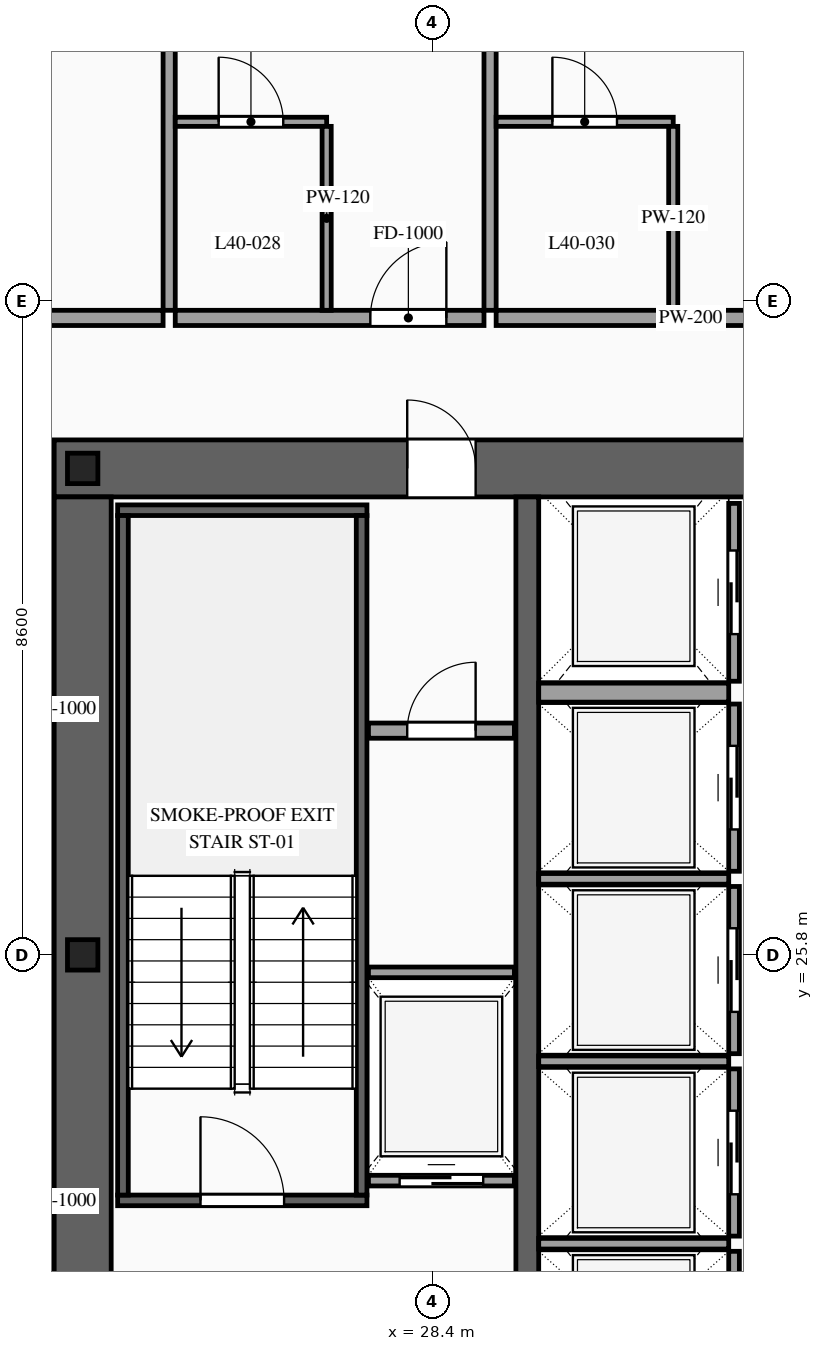
"""IFC4 building model, lengths in metres.
Left out: names, types, materials, properties, quantities, classifications, styles, units other than length and angle.
Written with IfcOpenShell. Run it as: python <this file> out.ifc"""

import sys

from ifc_helpers import new_model, si_unit, direction, frame, frame_2d, origin, origin_2d, place, context, subcontext, project, spatial, rectangle, i_section, extrude, source, transform, mapped, element, fill, save


model = new_model("IFC4")
c1 = context("Model", 3, precision=1e-05, world=origin(), true_north=direction((0.0, 1.0)))
c2 = subcontext(c1, "Body", "Model", "MODEL_VIEW")
j1 = project(units=[si_unit("LENGTHUNIT", "METRE"), si_unit("PLANEANGLEUNIT", "RADIAN")], contexts=[c1])
p1 = place(None, origin())
s1 = spatial("IfcSite", under=j1, at=p1, CompositionType="ELEMENT")
p2 = place(p1, origin())
s2 = spatial("IfcBuilding", under=s1, at=p2, CompositionType="ELEMENT")
p3 = place(p2, frame((0.0, 0.0, 152.4)))
s3 = spatial("IfcBuildingStorey", under=s2, at=p3, CompositionType="ELEMENT", Elevation=152.4)
p4 = place(p3, frame((23.425, 32.2, 0.0), z_axis=(0.0, 0.0, 1.0), x_axis=(1.0, 0.0, 0.0)))
e1 = element("IfcWall", 1, at=p4, inside=s3, PredefinedType="SHEAR", context=c2, shape_type="SweptSolid", body=[
    extrude(rectangle(XDim=27.15, YDim=0.75, at=frame_2d((13.575, 0.0))), origin(), (0.0, 0.0, 1.0), 3.6),
])
p5 = place(p4, frame((4.645, 0.0, 0.0)))
e2 = element("IfcOpeningElement", 2, at=p5, cuts=e1, PredefinedType="OPENING", context=c2, shape_type="SweptSolid", body=[
    extrude(rectangle(XDim=0.9, YDim=2.15, at=frame_2d((0.45, 1.075))), frame((0.0, 0.39, 0.0), z_axis=(0.0, -1.0, 0.0), x_axis=(1.0, 0.0, 0.0)), (0.0, 0.0, 1.0), 0.78),
])
p6 = place(p4, frame((9.925, 0.0, 0.0)))
e3 = element("IfcOpeningElement", 3, at=p6, cuts=e1, PredefinedType="OPENING", context=c2, shape_type="SweptSolid", body=[
    extrude(rectangle(XDim=1.1, YDim=2.2, at=frame_2d((0.55, 1.1))), frame((0.0, 0.39, 0.0), z_axis=(0.0, -1.0, 0.0), x_axis=(1.0, 0.0, 0.0)), (0.0, 0.0, 1.0), 0.78),
])
p7 = place(p4, frame((15.775, 0.0, 0.0)))
e4 = element("IfcOpeningElement", 4, at=p7, cuts=e1, PredefinedType="OPENING", context=c2, shape_type="SweptSolid", body=[
    extrude(rectangle(XDim=1.1, YDim=2.2, at=frame_2d((0.55, 1.1))), frame((0.0, 0.39, 0.0), z_axis=(0.0, -1.0, 0.0), x_axis=(1.0, 0.0, 0.0)), (0.0, 0.0, 1.0), 0.78),
])
p8 = place(p4, frame((19.745, 0.0, 0.0)))
e5 = element("IfcOpeningElement", 5, at=p8, cuts=e1, PredefinedType="OPENING", context=c2, shape_type="SweptSolid", body=[
    extrude(rectangle(XDim=0.9, YDim=2.15, at=frame_2d((0.45, 1.075))), frame((0.0, 0.39, 0.0), z_axis=(0.0, -1.0, 0.0), x_axis=(1.0, 0.0, 0.0)), (0.0, 0.0, 1.0), 0.78),
])
m1 = source(origin(), c2, "Body", "SweptSolid", [
    extrude(rectangle(XDim=12.05, YDim=0.75, at=frame_2d((6.025, 0.0))), origin(), (0.0, 0.0, 1.0), 3.6),
])
p9 = place(p3, frame((23.8, 19.775, 0.0), z_axis=(0.0, 0.0, 1.0), x_axis=(0.0, 1.0, 0.0)))
e6 = element("IfcWall", 6, at=p9, inside=s3, PredefinedType="SHEAR", context=c2, shape_type="MappedRepresentation", body=[
    mapped(m1, transform((0.0, 0.0, 0.0), scale=1.0)),
])
m2 = source(origin(), c2, "Body", "SweptSolid", [
    extrude(rectangle(XDim=12.05, YDim=0.3, at=frame_2d((6.025, 0.0))), origin(), (0.0, 0.0, 1.0), 3.6),
])
p10 = place(p3, frame((29.65, 19.775, 0.0), z_axis=(0.0, 0.0, 1.0), x_axis=(0.0, 1.0, 0.0)))
e7 = element("IfcWall", 7, at=p10, inside=s3, PredefinedType="SOLIDWALL", context=c2, shape_type="MappedRepresentation", body=[
    mapped(m2, transform((0.0, 0.0, 0.0), scale=1.0)),
])
m3 = source(origin(), c2, "Body", "SweptSolid", [
    extrude(i_section(OverallWidth=0.4, OverallDepth=0.4, WebThickness=0.013, FlangeThickness=0.021, at=origin_2d()), origin(), (0.0, 0.0, 1.0), 3.6),
])
for number, where, z_axis, x_axis in (
    (8, (23.8, 25.8, 0.0), (0.0, 0.0, 1.0), (1.0, 0.0, 0.0)),
    (9, (23.8, 32.2, 0.0), (0.0, 0.0, 1.0), (1.0, 0.0, 0.0)),
):
    element("IfcColumn", number, at=place(p3, frame(where, z_axis=z_axis, x_axis=x_axis)), inside=s3, PredefinedType="COLUMN", context=c2, shape_type="MappedRepresentation", body=[
        mapped(m3, transform((0.0, 0.0, 0.0), scale=1.0)),
    ])
p11 = place(p3, frame((27.56, 22.83, 0.0), z_axis=(0.0, 0.0, 1.0), x_axis=(1.0, 0.0, 0.0)))
e10 = element("IfcWall", 10, at=p11, inside=s3, PredefinedType="SOLIDWALL", context=c2, shape_type="SweptSolid", body=[
    extrude(rectangle(XDim=1.92, YDim=0.14, at=frame_2d((0.96, 0.0))), origin(), (0.0, 0.0, 1.0), 3.38),
])
p12 = place(p11, frame((0.41, 0.0, 0.0)))
e11 = element("IfcOpeningElement", 11, at=p12, cuts=e10, PredefinedType="OPENING", context=c2, shape_type="SweptSolid", body=[
    extrude(rectangle(XDim=1.1, YDim=2.2, at=frame_2d((0.55, 1.1))), frame((0.0, 0.085, 0.0), z_axis=(0.0, -1.0, 0.0), x_axis=(1.0, 0.0, 0.0)), (0.0, 0.0, 1.0), 0.17),
])
m4 = source(origin(), c2, "Body", "SweptSolid", [
    extrude(rectangle(XDim=1.92, YDim=0.14, at=frame_2d((0.96, 0.0))), origin(), (0.0, 0.0, 1.0), 3.38),
])
p13 = place(p3, frame((27.56, 25.57, 0.0), z_axis=(0.0, 0.0, 1.0), x_axis=(1.0, 0.0, 0.0)))
e12 = element("IfcWall", 12, at=p13, inside=s3, PredefinedType="SOLIDWALL", context=c2, shape_type="MappedRepresentation", body=[
    mapped(m4, transform((0.0, 0.0, 0.0), scale=1.0)),
])
p14 = place(p3, frame((32.37, 19.86, 0.0), z_axis=(0.0, 0.0, 1.0), x_axis=(0.0, 1.0, 0.0)))
e13 = element("IfcWall", 13, at=p14, inside=s3, PredefinedType="SOLIDWALL", context=c2, shape_type="SweptSolid", body=[
    extrude(rectangle(XDim=2.04, YDim=0.14, at=frame_2d((1.02, 0.0))), origin(), (0.0, 0.0, 1.0), 3.38),
])
p15 = place(p14, frame((0.47, 0.0, 0.0)))
e14 = element("IfcOpeningElement", 14, at=p15, cuts=e13, PredefinedType="OPENING", context=c2, shape_type="SweptSolid", body=[
    extrude(rectangle(XDim=1.1, YDim=2.2, at=frame_2d((0.55, 1.1))), frame((0.0, 0.085, 0.0), z_axis=(0.0, -1.0, 0.0), x_axis=(1.0, 0.0, 0.0)), (0.0, 0.0, 1.0), 0.17),
])
m5 = source(origin(), c2, "Body", "SweptSolid", [
    extrude(rectangle(XDim=2.5, YDim=0.14, at=frame_2d((1.25, 0.0))), origin(), (0.0, 0.0, 1.0), 3.38),
])
p16 = place(p3, frame((29.8, 22.0, 0.0), z_axis=(0.0, 0.0, 1.0), x_axis=(1.0, 0.0, 0.0)))
e15 = element("IfcWall", 15, at=p16, inside=s3, PredefinedType="SOLIDWALL", context=c2, shape_type="MappedRepresentation", body=[
    mapped(m5, transform((0.0, 0.0, 0.0), scale=1.0)),
])
p17 = place(p3, frame((32.37, 22.1, 0.0), z_axis=(0.0, 0.0, 1.0), x_axis=(0.0, 1.0, 0.0)))
e16 = element("IfcWall", 16, at=p17, inside=s3, PredefinedType="SOLIDWALL", context=c2, shape_type="SweptSolid", body=[
    extrude(rectangle(XDim=2.2, YDim=0.14, at=frame_2d((1.1, 0.0))), origin(), (0.0, 0.0, 1.0), 3.38),
])
p18 = place(p17, frame((0.55, 0.0, 0.0)))
e17 = element("IfcOpeningElement", 17, at=p18, cuts=e16, PredefinedType="OPENING", context=c2, shape_type="SweptSolid", body=[
    extrude(rectangle(XDim=1.1, YDim=2.2, at=frame_2d((0.55, 1.1))), frame((0.0, 0.085, 0.0), z_axis=(0.0, -1.0, 0.0), x_axis=(1.0, 0.0, 0.0)), (0.0, 0.0, 1.0), 0.17),
])
p19 = place(p3, frame((29.8, 24.4, 0.0), z_axis=(0.0, 0.0, 1.0), x_axis=(1.0, 0.0, 0.0)))
e18 = element("IfcWall", 18, at=p19, inside=s3, PredefinedType="SOLIDWALL", context=c2, shape_type="MappedRepresentation", body=[
    mapped(m5, transform((0.0, 0.0, 0.0), scale=1.0)),
])
p20 = place(p3, frame((32.37, 24.5, 0.0), z_axis=(0.0, 0.0, 1.0), x_axis=(0.0, 1.0, 0.0)))
e19 = element("IfcWall", 19, at=p20, inside=s3, PredefinedType="SOLIDWALL", context=c2, shape_type="SweptSolid", body=[
    extrude(rectangle(XDim=2.2, YDim=0.14, at=frame_2d((1.1, 0.0))), origin(), (0.0, 0.0, 1.0), 3.38),
])
p21 = place(p20, frame((0.55, 0.0, 0.0)))
e20 = element("IfcOpeningElement", 20, at=p21, cuts=e19, PredefinedType="OPENING", context=c2, shape_type="SweptSolid", body=[
    extrude(rectangle(XDim=1.1, YDim=2.2, at=frame_2d((0.55, 1.1))), frame((0.0, 0.085, 0.0), z_axis=(0.0, -1.0, 0.0), x_axis=(1.0, 0.0, 0.0)), (0.0, 0.0, 1.0), 0.17),
])
p22 = place(p3, frame((29.8, 26.8, 0.0), z_axis=(0.0, 0.0, 1.0), x_axis=(1.0, 0.0, 0.0)))
e21 = element("IfcWall", 21, at=p22, inside=s3, PredefinedType="SOLIDWALL", context=c2, shape_type="MappedRepresentation", body=[
    mapped(m5, transform((0.0, 0.0, 0.0), scale=1.0)),
])
p23 = place(p3, frame((32.37, 26.9, 0.0), z_axis=(0.0, 0.0, 1.0), x_axis=(0.0, 1.0, 0.0)))
e22 = element("IfcWall", 22, at=p23, inside=s3, PredefinedType="SOLIDWALL", context=c2, shape_type="SweptSolid", body=[
    extrude(rectangle(XDim=2.2, YDim=0.14, at=frame_2d((1.1, 0.0))), origin(), (0.0, 0.0, 1.0), 3.38),
])
p24 = place(p23, frame((0.55, 0.0, 0.0)))
e23 = element("IfcOpeningElement", 23, at=p24, cuts=e22, PredefinedType="OPENING", context=c2, shape_type="SweptSolid", body=[
    extrude(rectangle(XDim=1.1, YDim=2.2, at=frame_2d((0.55, 1.1))), frame((0.0, 0.085, 0.0), z_axis=(0.0, -1.0, 0.0), x_axis=(1.0, 0.0, 0.0)), (0.0, 0.0, 1.0), 0.17),
])
p25 = place(p3, frame((32.37, 29.4, 0.0), z_axis=(0.0, 0.0, 1.0), x_axis=(0.0, 1.0, 0.0)))
e24 = element("IfcWall", 24, at=p25, inside=s3, PredefinedType="SOLIDWALL", context=c2, shape_type="SweptSolid", body=[
    extrude(rectangle(XDim=2.34, YDim=0.14, at=frame_2d((1.17, 0.0))), origin(), (0.0, 0.0, 1.0), 3.38),
])
p26 = place(p25, frame((0.62, 0.0, 0.0)))
e25 = element("IfcOpeningElement", 25, at=p26, cuts=e24, PredefinedType="OPENING", context=c2, shape_type="SweptSolid", body=[
    extrude(rectangle(XDim=1.1, YDim=2.2, at=frame_2d((0.55, 1.1))), frame((0.0, 0.085, 0.0), z_axis=(0.0, -1.0, 0.0), x_axis=(1.0, 0.0, 0.0)), (0.0, 0.0, 1.0), 0.17),
])
m6 = source(origin(), c2, "Body", "SweptSolid", [
    extrude(rectangle(XDim=2.5, YDim=0.25, at=frame_2d((1.25, 0.0))), origin(), (0.0, 0.0, 1.0), 3.38),
])
p27 = place(p3, frame((29.8, 29.25, 0.0), z_axis=(0.0, 0.0, 1.0), x_axis=(1.0, 0.0, 0.0)))
e26 = element("IfcWall", 26, at=p27, inside=s3, PredefinedType="SOLIDWALL", context=c2, shape_type="MappedRepresentation", body=[
    mapped(m6, transform((0.0, 0.0, 0.0), scale=1.0)),
])
p28 = place(p3, frame((24.26, 22.57, 0.0), z_axis=(0.0, 0.0, 1.0), x_axis=(1.0, 0.0, 0.0)))
e27 = element("IfcWall", 27, at=p28, inside=s3, PredefinedType="SOLIDWALL", context=c2, shape_type="SweptSolid", body=[
    extrude(rectangle(XDim=3.28, YDim=0.14, at=frame_2d((1.64, 0.0))), origin(), (0.0, 0.0, 1.0), 3.38),
])
p29 = place(p28, frame((1.09, 0.0, 0.0)))
e28 = element("IfcOpeningElement", 28, at=p29, cuts=e27, PredefinedType="OPENING", context=c2, shape_type="SweptSolid", body=[
    extrude(rectangle(XDim=1.1, YDim=2.2, at=frame_2d((0.55, 1.1))), frame((0.0, 0.085, 0.0), z_axis=(0.0, -1.0, 0.0), x_axis=(1.0, 0.0, 0.0)), (0.0, 0.0, 1.0), 0.17),
])
m7 = source(origin(), c2, "Body", "SweptSolid", [
    extrude(rectangle(XDim=3.28, YDim=0.14, at=frame_2d((1.64, 0.0))), origin(), (0.0, 0.0, 1.0), 3.38),
])
p30 = place(p3, frame((24.26, 31.65, 0.0), z_axis=(0.0, 0.0, 1.0), x_axis=(1.0, 0.0, 0.0)))
e29 = element("IfcWall", 29, at=p30, inside=s3, PredefinedType="SOLIDWALL", context=c2, shape_type="MappedRepresentation", body=[
    mapped(m7, transform((0.0, 0.0, 0.0), scale=1.0)),
])
m8 = source(origin(), c2, "Body", "SweptSolid", [
    extrude(rectangle(XDim=8.94, YDim=0.14, at=frame_2d((4.47, 0.0))), origin(), (0.0, 0.0, 1.0), 3.38),
])
for number, where, z_axis, x_axis in (
    (30, (24.33, 22.64, 0.0), (0.0, 0.0, 1.0), (0.0, 1.0, 0.0)),
    (31, (27.47, 22.64, 0.0), (0.0, 0.0, 1.0), (0.0, 1.0, 0.0)),
):
    element("IfcWall", number, at=place(p3, frame(where, z_axis=z_axis, x_axis=x_axis)), inside=s3, PredefinedType="SOLIDWALL", context=c2, shape_type="MappedRepresentation", body=[
        mapped(m8, transform((0.0, 0.0, 0.0), scale=1.0)),
    ])
p31 = place(p3, frame((27.56, 28.75, 0.0), z_axis=(0.0, 0.0, 1.0), x_axis=(1.0, 0.0, 0.0)))
e32 = element("IfcWall", 32, at=p31, inside=s3, PredefinedType="PARTITIONING", context=c2, shape_type="SweptSolid", body=[
    extrude(rectangle(XDim=1.92, YDim=0.2, at=frame_2d((0.96, 0.0))), origin(), (0.0, 0.0, 1.0), 3.38),
])
p32 = place(p31, frame((0.51, 0.0, 0.0)))
e33 = element("IfcOpeningElement", 33, at=p32, cuts=e32, PredefinedType="OPENING", context=c2, shape_type="SweptSolid", body=[
    extrude(rectangle(XDim=0.9, YDim=2.15, at=frame_2d((0.45, 1.075))), frame((0.0, 0.115, 0.0), z_axis=(0.0, -1.0, 0.0), x_axis=(1.0, 0.0, 0.0)), (0.0, 0.0, 1.0), 0.23),
])
p33 = place(p3, frame((16.44, 34.18, 0.0), z_axis=(0.0, 0.0, 1.0), x_axis=(1.0, 0.0, 0.0)))
e34 = element("IfcWall", 34, at=p33, inside=s3, PredefinedType="PARTITIONING", context=c2, shape_type="SweptSolid", body=[
    extrude(rectangle(XDim=8.418, YDim=0.2, at=frame_2d((4.209, 0.0))), origin(), (0.0, 0.0, 1.0), 3.38),
])
p34 = place(p33, frame((4.914, 0.0, 0.0)))
e35 = element("IfcOpeningElement", 35, at=p34, cuts=e34, PredefinedType="OPENING", context=c2, shape_type="SweptSolid", body=[
    extrude(rectangle(XDim=1.0, YDim=2.2, at=frame_2d((0.5, 1.1))), frame((0.0, 0.115, 0.0), z_axis=(0.0, -1.0, 0.0), x_axis=(1.0, 0.0, 0.0)), (0.0, 0.0, 1.0), 0.23),
])
m9 = source(origin(), c2, "Body", "SweptSolid", [
    extrude(rectangle(XDim=14.97, YDim=0.16, at=frame_2d((7.485, 0.0))), origin(), (0.0, 0.0, 1.0), 3.38),
])
p35 = place(p3, frame((24.938, 34.28, 0.0), z_axis=(0.0, 0.0, 1.0), x_axis=(0.0, 1.0, 0.0)))
e36 = element("IfcWall", 36, at=p35, inside=s3, PredefinedType="PARTITIONING", context=c2, shape_type="MappedRepresentation", body=[
    mapped(m9, transform((0.0, 0.0, 0.0), scale=1.0)),
])
p36 = place(p3, frame((25.018, 34.18, 0.0), z_axis=(0.0, 0.0, 1.0), x_axis=(1.0, 0.0, 0.0)))
e37 = element("IfcWall", 37, at=p36, inside=s3, PredefinedType="PARTITIONING", context=c2, shape_type="SweptSolid", body=[
    extrude(rectangle(XDim=4.062, YDim=0.2, at=frame_2d((2.031, 0.0))), origin(), (0.0, 0.0, 1.0), 3.38),
])
p37 = place(p36, frame((2.567, 0.0, 0.0)))
e38 = element("IfcOpeningElement", 38, at=p37, cuts=e37, PredefinedType="OPENING", context=c2, shape_type="SweptSolid", body=[
    extrude(rectangle(XDim=1.0, YDim=2.2, at=frame_2d((0.5, 1.1))), frame((0.0, 0.115, 0.0), z_axis=(0.0, -1.0, 0.0), x_axis=(1.0, 0.0, 0.0)), (0.0, 0.0, 1.0), 0.23),
])
p38 = place(p3, frame((29.16, 34.28, 0.0), z_axis=(0.0, 0.0, 1.0), x_axis=(0.0, 1.0, 0.0)))
e39 = element("IfcWall", 39, at=p38, inside=s3, PredefinedType="PARTITIONING", context=c2, shape_type="MappedRepresentation", body=[
    mapped(m9, transform((0.0, 0.0, 0.0), scale=1.0)),
])
p39 = place(p3, frame((25.018, 36.76, 0.0), z_axis=(0.0, 0.0, 1.0), x_axis=(1.0, 0.0, 0.0)))
e40 = element("IfcWall", 40, at=p39, inside=s3, PredefinedType="PARTITIONING", context=c2, shape_type="SweptSolid", body=[
    extrude(rectangle(XDim=1.992, YDim=0.12, at=frame_2d((0.996, 0.0))), origin(), (0.0, 0.0, 1.0), 3.38),
])
p40 = place(p39, frame((0.571, 0.0, 0.0)))
e41 = element("IfcOpeningElement", 41, at=p40, cuts=e40, PredefinedType="OPENING", context=c2, shape_type="SweptSolid", body=[
    extrude(rectangle(XDim=0.85, YDim=2.1, at=frame_2d((0.425, 1.05))), frame((0.0, 0.075, 0.0), z_axis=(0.0, -1.0, 0.0), x_axis=(1.0, 0.0, 0.0)), (0.0, 0.0, 1.0), 0.15),
])
m10 = source(origin(), c2, "Body", "SweptSolid", [
    extrude(rectangle(XDim=2.42, YDim=0.12, at=frame_2d((1.21, 0.0))), origin(), (0.0, 0.0, 1.0), 3.38),
])
p41 = place(p3, frame((27.01, 34.28, 0.0), z_axis=(0.0, 0.0, 1.0), x_axis=(0.0, 1.0, 0.0)))
e42 = element("IfcWall", 42, at=p41, inside=s3, PredefinedType="PARTITIONING", context=c2, shape_type="MappedRepresentation", body=[
    mapped(m10, transform((0.0, 0.0, 0.0), scale=1.0)),
])
p42 = place(p3, frame((29.24, 34.18, 0.0), z_axis=(0.0, 0.0, 1.0), x_axis=(1.0, 0.0, 0.0)))
e43 = element("IfcWall", 43, at=p42, inside=s3, PredefinedType="PARTITIONING", context=c2, shape_type="SweptSolid", body=[
    extrude(rectangle(XDim=9.325, YDim=0.2, at=frame_2d((4.663, 0.0))), origin(), (0.0, 0.0, 1.0), 3.38),
])
p43 = place(p42, frame((5.368, 0.0, 0.0)))
e44 = element("IfcOpeningElement", 44, at=p43, cuts=e43, PredefinedType="OPENING", context=c2, shape_type="SweptSolid", body=[
    extrude(rectangle(XDim=1.0, YDim=2.2, at=frame_2d((0.5, 1.1))), frame((0.0, 0.115, 0.0), z_axis=(0.0, -1.0, 0.0), x_axis=(1.0, 0.0, 0.0)), (0.0, 0.0, 1.0), 0.23),
])
p44 = place(p3, frame((29.24, 36.76, 0.0), z_axis=(0.0, 0.0, 1.0), x_axis=(1.0, 0.0, 0.0)))
e45 = element("IfcWall", 45, at=p44, inside=s3, PredefinedType="PARTITIONING", context=c2, shape_type="SweptSolid", body=[
    extrude(rectangle(XDim=2.33, YDim=0.12, at=frame_2d((1.165, 0.0))), origin(), (0.0, 0.0, 1.0), 3.38),
])
p45 = place(p44, frame((0.74, 0.0, 0.0)))
e46 = element("IfcOpeningElement", 46, at=p45, cuts=e45, PredefinedType="OPENING", context=c2, shape_type="SweptSolid", body=[
    extrude(rectangle(XDim=0.85, YDim=2.1, at=frame_2d((0.425, 1.05))), frame((0.0, 0.075, 0.0), z_axis=(0.0, -1.0, 0.0), x_axis=(1.0, 0.0, 0.0)), (0.0, 0.0, 1.0), 0.15),
])
p46 = place(p3, frame((31.57, 34.28, 0.0), z_axis=(0.0, 0.0, 1.0), x_axis=(0.0, 1.0, 0.0)))
e47 = element("IfcWall", 47, at=p46, inside=s3, PredefinedType="PARTITIONING", context=c2, shape_type="MappedRepresentation", body=[
    mapped(m10, transform((0.0, 0.0, 0.0), scale=1.0)),
])
m11 = source(origin(), c2, "Body", "SweptSolid", [
    extrude(rectangle(XDim=1.1, YDim=2.2, at=frame_2d((0.55, 1.1))), frame((0.0, 0.025, 0.0), z_axis=(0.0, -1.0, 0.0), x_axis=(1.0, 0.0, 0.0)), (0.0, 0.0, 1.0), 0.05),
])
p47 = place(p12, origin())
e48 = element("IfcDoor", 48, at=p47, inside=s3, OperationType="SLIDING_TO_LEFT", PredefinedType="DOOR", context=c2, shape_type="MappedRepresentation", body=[
    mapped(m11, transform((0.0, 0.0, 0.0), scale=1.0)),
])
fill(e11, e48)
p48 = place(p18, origin())
e49 = element("IfcDoor", 49, at=p48, inside=s3, OperationType="SLIDING_TO_RIGHT", PredefinedType="DOOR", context=c2, shape_type="MappedRepresentation", body=[
    mapped(m11, transform((0.0, 0.0, 0.0), scale=1.0)),
])
fill(e17, e49)
p49 = place(p21, origin())
e50 = element("IfcDoor", 50, at=p49, inside=s3, OperationType="SLIDING_TO_LEFT", PredefinedType="DOOR", context=c2, shape_type="MappedRepresentation", body=[
    mapped(m11, transform((0.0, 0.0, 0.0), scale=1.0)),
])
fill(e20, e50)
p50 = place(p24, origin())
e51 = element("IfcDoor", 51, at=p50, inside=s3, OperationType="SLIDING_TO_RIGHT", PredefinedType="DOOR", context=c2, shape_type="MappedRepresentation", body=[
    mapped(m11, transform((0.0, 0.0, 0.0), scale=1.0)),
])
fill(e23, e51)
p51 = place(p26, origin())
e52 = element("IfcDoor", 52, at=p51, inside=s3, OperationType="SLIDING_TO_LEFT", PredefinedType="DOOR", context=c2, shape_type="MappedRepresentation", body=[
    mapped(m11, transform((0.0, 0.0, 0.0), scale=1.0)),
])
fill(e25, e52)
m12 = source(origin(), c2, "Body", "SweptSolid", [
    extrude(rectangle(XDim=1.1, YDim=2.2, at=frame_2d((0.55, 1.1))), frame((0.0, 0.025, 0.0), z_axis=(0.0, -1.0, 0.0), x_axis=(1.0, 0.0, 0.0)), (0.0, 0.0, 1.0), 0.05),
])
p52 = place(p29, origin())
e53 = element("IfcDoor", 53, at=p52, inside=s3, OperationType="SINGLE_SWING_LEFT", PredefinedType="DOOR", context=c2, shape_type="MappedRepresentation", body=[
    mapped(m12, transform((0.0, 0.0, 0.0), scale=1.0)),
])
fill(e28, e53)
m13 = source(origin(), c2, "Body", "SweptSolid", [
    extrude(rectangle(XDim=0.9, YDim=2.15, at=frame_2d((0.45, 1.075))), frame((0.0, 0.025, 0.0), z_axis=(0.0, -1.0, 0.0), x_axis=(1.0, 0.0, 0.0)), (0.0, 0.0, 1.0), 0.05),
])
p53 = place(p5, origin())
e54 = element("IfcDoor", 54, at=p53, inside=s3, OperationType="SINGLE_SWING_LEFT", PredefinedType="DOOR", context=c2, shape_type="MappedRepresentation", body=[
    mapped(m13, transform((0.0, 0.0, 0.0), scale=1.0)),
])
fill(e2, e54)
p54 = place(p32, origin())
e55 = element("IfcDoor", 55, at=p54, inside=s3, OperationType="SINGLE_SWING_RIGHT", PredefinedType="DOOR", context=c2, shape_type="MappedRepresentation", body=[
    mapped(m13, transform((0.0, 0.0, 0.0), scale=1.0)),
])
fill(e33, e55)
m14 = source(origin(), c2, "Body", "SweptSolid", [
    extrude(rectangle(XDim=1.0, YDim=2.2, at=frame_2d((0.5, 1.1))), frame((0.0, 0.025, 0.0), z_axis=(0.0, -1.0, 0.0), x_axis=(1.0, 0.0, 0.0)), (0.0, 0.0, 1.0), 0.05),
])
p55 = place(p37, origin())
e56 = element("IfcDoor", 56, at=p55, inside=s3, OperationType="SINGLE_SWING_RIGHT", PredefinedType="DOOR", context=c2, shape_type="MappedRepresentation", body=[
    mapped(m14, transform((0.0, 0.0, 0.0), scale=1.0)),
])
fill(e38, e56)
m15 = source(origin(), c2, "Body", "SweptSolid", [
    extrude(rectangle(XDim=0.85, YDim=2.1, at=frame_2d((0.425, 1.05))), frame((0.0, 0.025, 0.0), z_axis=(0.0, -1.0, 0.0), x_axis=(1.0, 0.0, 0.0)), (0.0, 0.0, 1.0), 0.05),
])
p56 = place(p40, origin())
e57 = element("IfcDoor", 57, at=p56, inside=s3, OperationType="SINGLE_SWING_LEFT", PredefinedType="DOOR", context=c2, shape_type="MappedRepresentation", body=[
    mapped(m15, transform((0.0, 0.0, 0.0), scale=1.0)),
])
fill(e41, e57)
p57 = place(p45, origin())
e58 = element("IfcDoor", 58, at=p57, inside=s3, OperationType="SINGLE_SWING_LEFT", PredefinedType="DOOR", context=c2, shape_type="MappedRepresentation", body=[
    mapped(m15, transform((0.0, 0.0, 0.0), scale=1.0)),
])
fill(e46, e58)
save(model, sys.argv[1])
